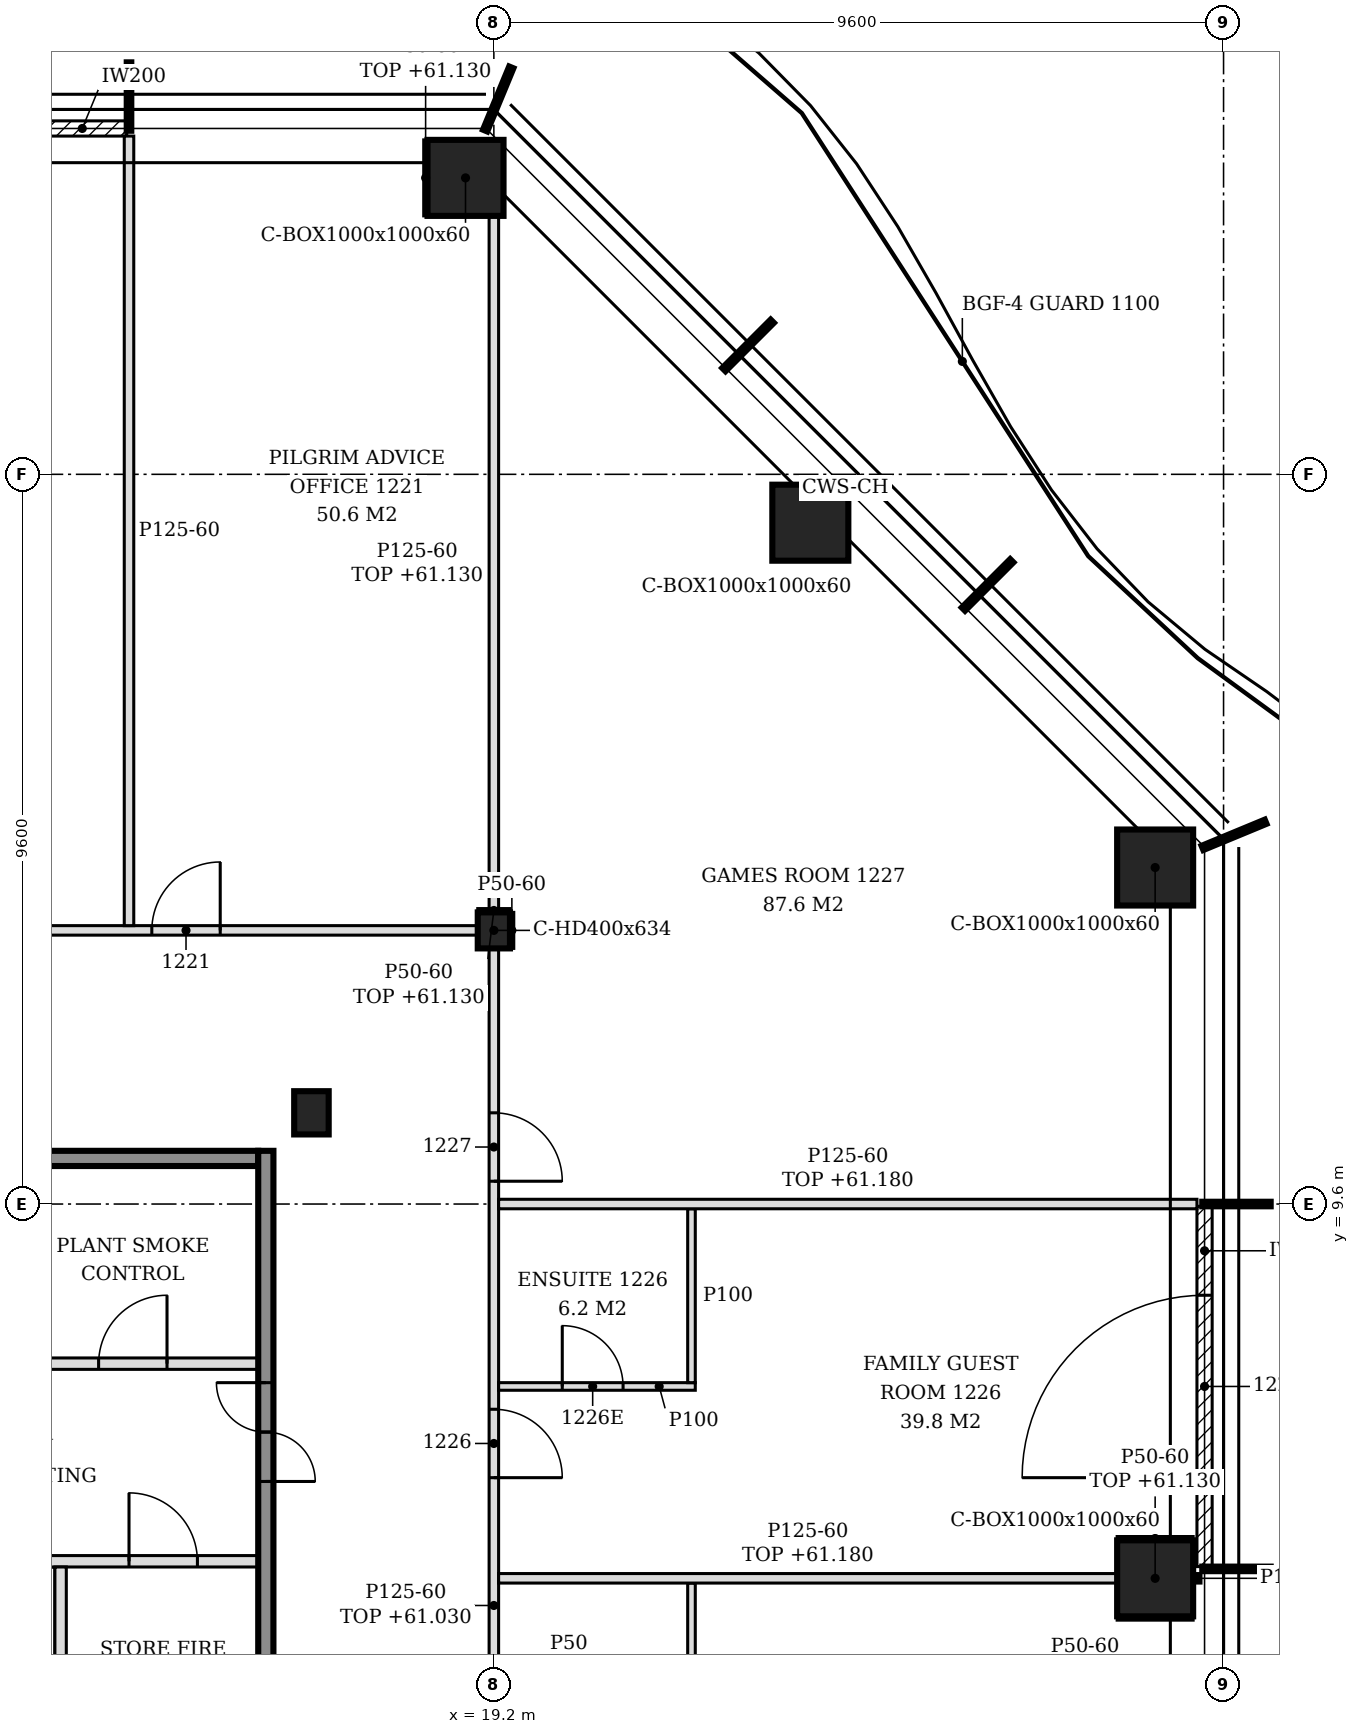
"""IFC4 building model, lengths in metres.
Left out: names, types, materials, properties, quantities, classifications, styles, units other than length and angle.
Written with IfcOpenShell. Run it as: python <this file> out.ifc"""

import sys

from ifc_helpers import new_model, si_unit, direction, frame, frame_2d, origin, origin_2d, place, context, subcontext, project, spatial, polyline, rectangle, hollow_rectangle, i_section, outline, extrude, element, fill, save


model = new_model("IFC4")
c1 = context("Model", 3, precision=1e-05, world=origin(), true_north=direction((0.0, 1.0)))
c2 = subcontext(c1, "Body", "Model", "MODEL_VIEW")
j1 = project(units=[si_unit("LENGTHUNIT", "METRE"), si_unit("PLANEANGLEUNIT", "RADIAN")], contexts=[c1])
p1 = place(None, origin())
s1 = spatial("IfcSite", under=j1, at=p1, CompositionType="ELEMENT")
p2 = place(p1, origin())
s2 = spatial("IfcBuilding", under=s1, at=p2, CompositionType="ELEMENT")
p3 = place(p2, frame((0.0, 0.0, 58.2)))
s3 = spatial("IfcBuildingStorey", under=s2, at=p3, CompositionType="ELEMENT", Elevation=58.2)
for number, where, z_axis, x_axis in (
    (1, (27.9, 4.676, -0.15), (0.0, 0.0, 1.0), (1.0, 0.0, 0.0)),
    (2, (27.9, 14.027, -0.15), (0.0, 0.0, 1.0), (1.0, 0.0, 0.0)),
    (3, (23.364, 18.564, -0.15), (0.0, 0.0, 1.0), (1.0, 0.0, 0.0)),
    (4, (18.827, 23.1, -0.15), (0.0, 0.0, 1.0), (1.0, 0.0, 0.0)),
):
    element("IfcColumn", number, at=place(p3, frame(where, z_axis=z_axis, x_axis=x_axis)), inside=s3, PredefinedType="COLUMN", context=c2, shape_type="SweptSolid", body=[
        extrude(hollow_rectangle(XDim=1.0, YDim=1.0, WallThickness=0.06, at=origin_2d()), origin(), (0.0, 0.0, 1.0), 3.6),
    ])
p4 = place(p3, frame((19.2, 13.2, -0.15), z_axis=(0.0, 0.0, 1.0), x_axis=(1.0, 0.0, 0.0)))
e5 = element("IfcColumn", 5, at=p4, inside=s3, PredefinedType="COLUMN", context=c2, shape_type="SweptSolid", body=[
    extrude(i_section(OverallWidth=0.424, OverallDepth=0.474, WebThickness=0.048, FlangeThickness=0.077, FilletRadius=0.015, at=origin_2d()), origin(), (0.0, 0.0, 1.0), 3.6),
])
p5 = place(p3, frame((16.8, 10.8, -0.15), z_axis=(0.0, 0.0, 1.0), x_axis=(1.0, 0.0, 0.0)))
e6 = element("IfcColumn", 6, at=p5, inside=s3, PredefinedType="COLUMN", context=c2, shape_type="SweptSolid", body=[
    extrude(i_section(OverallWidth=0.454, OverallDepth=0.569, WebThickness=0.078, FlangeThickness=0.125, FilletRadius=0.015, at=origin_2d()), origin(), (0.0, 0.0, 1.0), 3.6),
])
p6 = place(p3, frame((28.55, 4.83, 0.0), z_axis=(0.0, 0.0, 1.0), x_axis=(0.0, 1.0, 0.0)))
e7 = element("IfcWall", 7, at=p6, inside=s3, PredefinedType="NOTDEFINED", context=c2, shape_type="SweptSolid", body=[
    extrude(rectangle(XDim=4.74, YDim=0.2, at=frame_2d((2.37, 0.0))), origin(), (0.0, 0.0, 1.0), 3.45),
])
p7 = place(p6, frame((1.17, 0.0, 0.0)))
e8 = element("IfcOpeningElement", 8, at=p7, cuts=e7, PredefinedType="OPENING", context=c2, shape_type="SweptSolid", body=[
    extrude(rectangle(XDim=2.4, YDim=2.4, at=frame_2d((1.2, 1.2))), frame((0.0, 0.11, 0.0), z_axis=(0.0, -1.0, 0.0), x_axis=(1.0, 0.0, 0.0)), (0.0, 0.0, 1.0), 0.22),
])
p8 = place(p3, frame((14.37, 23.75, 0.0), z_axis=(0.0, 0.0, 1.0), x_axis=(-1.0, 0.0, 0.0)))
e9 = element("IfcWall", 9, at=p8, inside=s3, PredefinedType="NOTDEFINED", context=c2, shape_type="SweptSolid", body=[
    extrude(rectangle(XDim=4.74, YDim=0.2, at=frame_2d((2.37, 0.0))), origin(), (0.0, 0.0, 1.0), 3.45),
])
p9 = place(p8, frame((1.17, 0.0, 0.0)))
e10 = element("IfcOpeningElement", 10, at=p9, cuts=e9, PredefinedType="OPENING", context=c2, shape_type="SweptSolid", body=[
    extrude(rectangle(XDim=2.4, YDim=2.4, at=frame_2d((1.2, 1.2))), frame((0.0, 0.11, 0.0), z_axis=(0.0, -1.0, 0.0), x_axis=(1.0, 0.0, 0.0)), (0.0, 0.0, 1.0), 0.22),
])
p10 = place(p3, frame((9.7, 4.9, 0.0), z_axis=(0.0, 0.0, 1.0), x_axis=(1.0, 0.0, 0.0)))
e11 = element("IfcWall", 11, at=p10, inside=s3, PredefinedType="SOLIDWALL", context=c2, shape_type="SweptSolid", body=[
    extrude(rectangle(XDim=6.4, YDim=0.15, at=frame_2d((3.2, 0.0))), origin(), (0.0, 0.0, 1.0), 3.45),
])
p11 = place(p10, frame((0.45, 0.0, 0.0)))
e12 = element("IfcOpeningElement", 12, at=p11, cuts=e11, PredefinedType="OPENING", context=c2, shape_type="SweptSolid", body=[
    extrude(rectangle(XDim=1.0, YDim=2.1, at=frame_2d((0.5, 1.05))), frame((0.0, 0.085, 0.0), z_axis=(0.0, -1.0, 0.0), x_axis=(1.0, 0.0, 0.0)), (0.0, 0.0, 1.0), 0.17),
])
p12 = place(p10, frame((2.35, 0.0, 0.0)))
e13 = element("IfcOpeningElement", 13, at=p12, cuts=e11, PredefinedType="OPENING", context=c2, shape_type="SweptSolid", body=[
    extrude(rectangle(XDim=1.0, YDim=2.1, at=frame_2d((0.5, 1.05))), frame((0.0, 0.085, 0.0), z_axis=(0.0, -1.0, 0.0), x_axis=(1.0, 0.0, 0.0)), (0.0, 0.0, 1.0), 0.17),
])
p13 = place(p10, frame((4.7, 0.0, 0.0)))
e14 = element("IfcOpeningElement", 14, at=p13, cuts=e11, PredefinedType="OPENING", context=c2, shape_type="SweptSolid", body=[
    extrude(rectangle(XDim=0.9, YDim=2.1, at=frame_2d((0.45, 1.05))), frame((0.0, 0.085, 0.0), z_axis=(0.0, -1.0, 0.0), x_axis=(1.0, 0.0, 0.0)), (0.0, 0.0, 1.0), 0.17),
])
p14 = place(p3, frame((12.7, 7.5, 0.0), z_axis=(0.0, 0.0, 1.0), x_axis=(1.0, 0.0, 0.0)))
e15 = element("IfcWall", 15, at=p14, inside=s3, PredefinedType="SOLIDWALL", context=c2, shape_type="SweptSolid", body=[
    extrude(rectangle(XDim=3.4, YDim=0.15, at=frame_2d((1.7, 0.0))), origin(), (0.0, 0.0, 1.0), 3.45),
])
p15 = place(p14, frame((1.3, 0.0, 0.0)))
e16 = element("IfcOpeningElement", 16, at=p15, cuts=e15, PredefinedType="OPENING", context=c2, shape_type="SweptSolid", body=[
    extrude(rectangle(XDim=0.9, YDim=2.1, at=frame_2d((0.45, 1.05))), frame((0.0, 0.085, 0.0), z_axis=(0.0, -1.0, 0.0), x_axis=(1.0, 0.0, 0.0)), (0.0, 0.0, 1.0), 0.17),
])
p16 = place(p3, frame((12.7, 10.2, 0.0), z_axis=(0.0, 0.0, 1.0), x_axis=(1.0, 0.0, 0.0)))
e17 = element("IfcWall", 17, at=p16, inside=s3, PredefinedType="SOLIDWALL", context=c2, shape_type="SweptSolid", body=[
    extrude(rectangle(XDim=3.4, YDim=0.2, at=frame_2d((1.7, 0.0))), origin(), (0.0, 0.0, 1.0), 3.45),
])
p17 = place(p3, frame((13.5, 2.275, 0.0), z_axis=(0.0, 0.0, 1.0), x_axis=(0.0, 1.0, 0.0)))
e18 = element("IfcWall", 18, at=p17, inside=s3, PredefinedType="SOLIDWALL", context=c2, shape_type="SweptSolid", body=[
    extrude(rectangle(XDim=2.55, YDim=0.15, at=frame_2d((1.275, 0.0))), origin(), (0.0, 0.0, 1.0), 3.45),
])
p18 = place(p3, frame((16.2, -5.5, 0.0), z_axis=(0.0, 0.0, 1.0), x_axis=(0.0, 1.0, 0.0)))
e19 = element("IfcWall", 19, at=p18, inside=s3, PredefinedType="SOLIDWALL", context=c2, shape_type="SweptSolid", body=[
    extrude(rectangle(XDim=15.8, YDim=0.2, at=frame_2d((7.9, 0.0))), origin(), (0.0, 0.0, 1.0), 3.45),
])
p19 = place(p18, frame((3.05, 0.0, 0.0)))
e20 = element("IfcOpeningElement", 20, at=p19, cuts=e19, PredefinedType="OPENING", context=c2, shape_type="SweptSolid", body=[
    extrude(rectangle(XDim=1.3, YDim=2.1, at=frame_2d((0.65, 1.05))), frame((0.0, 0.11, 0.0), z_axis=(0.0, -1.0, 0.0), x_axis=(1.0, 0.0, 0.0)), (0.0, 0.0, 1.0), 0.22),
])
p20 = place(p18, frame((11.45, 0.0, 0.0)))
e21 = element("IfcOpeningElement", 21, at=p20, cuts=e19, PredefinedType="OPENING", context=c2, shape_type="SweptSolid", body=[
    extrude(rectangle(XDim=1.3, YDim=2.1, at=frame_2d((0.65, 1.05))), frame((0.0, 0.11, 0.0), z_axis=(0.0, -1.0, 0.0), x_axis=(1.0, 0.0, 0.0)), (0.0, 0.0, 1.0), 0.22),
])
p21 = place(p3, frame((21.8, 2.326, 0.0), z_axis=(0.0, 0.0, 1.0), x_axis=(0.0, 1.0, 0.0)))
e22 = element("IfcWall", 22, at=p21, inside=s3, PredefinedType="PARTITIONING", context=c2, shape_type="SweptSolid", body=[
    extrude(rectangle(XDim=2.288, YDim=0.1, at=frame_2d((1.144, 0.0))), origin(), (0.0, 0.0, 1.0), 3.45),
])
p22 = place(p3, frame((19.2, 2.637, 0.0), z_axis=(0.0, 0.0, 1.0), x_axis=(0.0, 1.0, 0.0)))
e23 = element("IfcWall", 23, at=p22, inside=s3, PredefinedType="PARTITIONING", context=c2, shape_type="SweptSolid", body=[
    extrude(rectangle(XDim=10.326, YDim=0.125, at=frame_2d((5.163, 0.0))), origin(), (0.0, 0.0, 1.0), 2.83),
])
p23 = place(p22, frame((3.363, 0.0, 0.0)))
e24 = element("IfcOpeningElement", 24, at=p23, cuts=e23, PredefinedType="OPENING", context=c2, shape_type="SweptSolid", body=[
    extrude(rectangle(XDim=0.9, YDim=2.1, at=frame_2d((0.45, 1.05))), frame((0.0, 0.073, 0.0), z_axis=(0.0, -1.0, 0.0), x_axis=(1.0, 0.0, 0.0)), (0.0, 0.0, 1.0), 0.145),
])
p24 = place(p22, frame((7.263, 0.0, 0.0)))
e25 = element("IfcOpeningElement", 25, at=p24, cuts=e23, PredefinedType="OPENING", context=c2, shape_type="SweptSolid", body=[
    extrude(rectangle(XDim=0.9, YDim=2.1, at=frame_2d((0.45, 1.05))), frame((0.0, 0.073, 0.0), z_axis=(0.0, -1.0, 0.0), x_axis=(1.0, 0.0, 0.0)), (0.0, 0.0, 1.0), 0.145),
])
p25 = place(p3, frame((19.262, 4.676, 0.0), z_axis=(0.0, 0.0, 1.0), x_axis=(1.0, 0.0, 0.0)))
e26 = element("IfcWall", 26, at=p25, inside=s3, PredefinedType="PARTITIONING", context=c2, shape_type="SweptSolid", body=[
    extrude(outline(polyline([(0.0, 0.0), (8.137, 0.0), (8.137, 2.98), (0.087, 2.98), (0.085, 2.83), (0.0, 2.83), (0.0, 0.0)])), frame((0.0, 0.062, 0.0), z_axis=(0.0, -1.0, 0.0), x_axis=(1.0, 0.0, 0.0)), (0.0, 0.0, 1.0), 0.125),
])
p26 = place(p3, frame((28.4, 4.676, 0.0), z_axis=(0.0, 0.0, 1.0), x_axis=(1.0, 0.0, 0.0)))
e27 = element("IfcWall", 27, at=p26, inside=s3, PredefinedType="PARTITIONING", context=c2, shape_type="SweptSolid", body=[
    extrude(rectangle(XDim=0.103, YDim=0.125, at=frame_2d((0.052, 0.0))), origin(), (0.0, 0.0, 1.0), 3.45),
])
p27 = place(p3, frame((19.262, 7.2, 0.0), z_axis=(0.0, 0.0, 1.0), x_axis=(1.0, 0.0, 0.0)))
e28 = element("IfcWall", 28, at=p27, inside=s3, PredefinedType="PARTITIONING", context=c2, shape_type="SweptSolid", body=[
    extrude(outline(polyline([(0.0, 0.0), (2.588, 0.0), (2.587, 3.45), (0.087, 3.45), (0.085, 2.83), (0.0, 2.83), (0.0, 0.0)])), frame((0.0, 0.05, 0.0), z_axis=(0.0, -1.0, 0.0), x_axis=(1.0, 0.0, 0.0)), (0.0, 0.0, 1.0), 0.1),
])
p28 = place(p27, frame((0.837, 0.0, 0.0)))
e29 = element("IfcOpeningElement", 29, at=p28, cuts=e28, PredefinedType="OPENING", context=c2, shape_type="SweptSolid", body=[
    extrude(rectangle(XDim=0.8, YDim=2.1, at=frame_2d((0.4, 1.05))), frame((0.0, 0.06, 0.0), z_axis=(0.0, -1.0, 0.0), x_axis=(1.0, 0.0, 0.0)), (0.0, 0.0, 1.0), 0.12),
])
p29 = place(p3, frame((21.8, 7.25, 0.0), z_axis=(0.0, 0.0, 1.0), x_axis=(0.0, 1.0, 0.0)))
e30 = element("IfcWall", 30, at=p29, inside=s3, PredefinedType="PARTITIONING", context=c2, shape_type="SweptSolid", body=[
    extrude(outline(polyline([(0.0, 0.0), (2.288, 0.0), (2.288, 2.98), (2.255, 2.98), (2.253, 3.45), (0.0, 3.45), (0.0, 0.0)])), frame((0.0, 0.05, 0.0), z_axis=(0.0, -1.0, 0.0), x_axis=(1.0, 0.0, 0.0)), (0.0, 0.0, 1.0), 0.1),
])
p30 = place(p3, frame((19.262, 9.6, 0.0), z_axis=(0.0, 0.0, 1.0), x_axis=(1.0, 0.0, 0.0)))
e31 = element("IfcWall", 31, at=p30, inside=s3, PredefinedType="PARTITIONING", context=c2, shape_type="SweptSolid", body=[
    extrude(outline(polyline([(0.0, 0.0), (9.188, 0.0), (9.188, 2.98), (8.788, 2.98), (8.785, 2.93), (8.488, 2.93), (8.486, 2.98), (0.087, 2.98), (0.085, 2.83), (0.0, 2.83), (0.0, 0.0)])), frame((0.0, 0.062, 0.0), z_axis=(0.0, -1.0, 0.0), x_axis=(1.0, 0.0, 0.0)), (0.0, 0.0, 1.0), 0.125),
])
p31 = place(p3, frame((7.412, 13.2, 0.0), z_axis=(0.0, 0.0, 1.0), x_axis=(1.0, 0.0, 0.0)))
e32 = element("IfcWall", 32, at=p31, inside=s3, PredefinedType="PARTITIONING", context=c2, shape_type="SweptSolid", body=[
    extrude(rectangle(XDim=11.576, YDim=0.125, at=frame_2d((5.788, 0.0))), origin(), (0.0, 0.0, 1.0), 2.83),
])
p32 = place(p31, frame((4.602, 0.0, 0.0)))
e33 = element("IfcOpeningElement", 33, at=p32, cuts=e32, PredefinedType="OPENING", context=c2, shape_type="SweptSolid", body=[
    extrude(rectangle(XDim=0.9, YDim=2.1, at=frame_2d((0.45, 1.05))), frame((0.0, 0.073, 0.0), z_axis=(0.0, -1.0, 0.0), x_axis=(1.0, 0.0, 0.0)), (0.0, 0.0, 1.0), 0.145),
])
p33 = place(p31, frame((7.288, 0.0, 0.0)))
e34 = element("IfcOpeningElement", 34, at=p33, cuts=e32, PredefinedType="OPENING", context=c2, shape_type="SweptSolid", body=[
    extrude(rectangle(XDim=0.9, YDim=2.1, at=frame_2d((0.45, 1.05))), frame((0.0, 0.073, 0.0), z_axis=(0.0, -1.0, 0.0), x_axis=(1.0, 0.0, 0.0)), (0.0, 0.0, 1.0), 0.145),
])
p34 = place(p3, frame((14.4, 13.262, 0.0), z_axis=(0.0, 0.0, 1.0), x_axis=(0.0, 1.0, 0.0)))
e35 = element("IfcWall", 35, at=p34, inside=s3, PredefinedType="PARTITIONING", context=c2, shape_type="SweptSolid", body=[
    extrude(outline(polyline([(0.0, 0.0), (10.387, 0.0), (10.387, 3.45), (9.988, 3.45), (9.986, 2.93), (9.688, 2.93), (9.686, 3.45), (6.042, 3.45), (6.041, 2.88), (5.833, 2.88), (5.831, 3.45), (0.087, 3.45), (0.085, 2.83), (0.0, 2.83), (0.0, 0.0)])), frame((0.0, 0.062, 0.0), z_axis=(0.0, -1.0, 0.0), x_axis=(1.0, 0.0, 0.0)), (0.0, 0.0, 1.0), 0.125),
])
p35 = place(p3, frame((19.2, 13.437, 0.0), z_axis=(0.0, 0.0, 1.0), x_axis=(0.0, 1.0, 0.0)))
e36 = element("IfcWall", 36, at=p35, inside=s3, PredefinedType="PARTITIONING", context=c2, shape_type="SweptSolid", body=[
    extrude(outline(polyline([(0.0, 0.0), (9.163, 0.0), (9.163, 2.63), (8.733, 2.63), (8.731, 2.93), (0.0, 2.93), (0.0, 0.0)])), frame((0.0, 0.062, 0.0), z_axis=(0.0, -1.0, 0.0), x_axis=(1.0, 0.0, 0.0)), (0.0, 0.0, 1.0), 0.125),
])
p36 = place(p3, frame((19.437, 12.963, 0.0), z_axis=(0.0, 0.0, 1.0), x_axis=(0.0, 1.0, 0.0)))
e37 = element("IfcWall", 37, at=p36, inside=s3, PredefinedType="PARTITIONING", context=c2, shape_type="SweptSolid", body=[
    extrude(rectangle(XDim=0.474, YDim=0.05, at=frame_2d((0.237, 0.0))), origin(), (0.0, 0.0, 1.0), 3.45),
])
for number, where, z_axis, x_axis in (
    (38, (27.4, 5.201, 0.0), (0.0, 0.0, 1.0), (1.0, 0.0, 0.0)),
    (39, (27.4, 4.151, 0.0), (0.0, 0.0, 1.0), (1.0, 0.0, 0.0)),
):
    element("IfcWall", number, at=place(p3, frame(where, z_axis=z_axis, x_axis=x_axis)), inside=s3, PredefinedType="PARTITIONING", context=c2, shape_type="SweptSolid", body=[
        extrude(rectangle(XDim=1.0, YDim=0.05, at=frame_2d((0.5, 0.0))), origin(), (0.0, 0.0, 1.0), 2.93),
    ])
p37 = place(p3, frame((18.988, 13.462, 0.0), z_axis=(0.0, 0.0, 1.0), x_axis=(1.0, 0.0, 0.0)))
e40 = element("IfcWall", 40, at=p37, inside=s3, PredefinedType="PARTITIONING", context=c2, shape_type="SweptSolid", body=[
    extrude(rectangle(XDim=0.424, YDim=0.05, at=frame_2d((0.212, 0.0))), origin(), (0.0, 0.0, 1.0), 2.93),
])
p38 = place(p3, frame((18.302, 22.6, 0.0), z_axis=(0.0, 0.0, 1.0), x_axis=(0.0, 1.0, 0.0)))
e41 = element("IfcWall", 41, at=p38, inside=s3, PredefinedType="PARTITIONING", context=c2, shape_type="SweptSolid", body=[
    extrude(rectangle(XDim=1.0, YDim=0.05, at=frame_2d((0.5, 0.0))), origin(), (0.0, 0.0, 1.0), 2.93),
])
p39 = place(p7, origin())
e42 = element("IfcDoor", 42, at=p39, inside=s3, OperationType="SINGLE_SWING_LEFT", PredefinedType="DOOR", context=c2, shape_type="SweptSolid", body=[
    extrude(rectangle(XDim=2.4, YDim=2.4, at=frame_2d((1.2, 1.2))), frame((0.0, 0.025, 0.0), z_axis=(0.0, -1.0, 0.0), x_axis=(1.0, 0.0, 0.0)), (0.0, 0.0, 1.0), 0.05),
])
fill(e8, e42)
p40 = place(p20, origin())
e43 = element("IfcDoor", 43, at=p40, inside=s3, OperationType="DOUBLE_DOOR_SINGLE_SWING", PredefinedType="DOOR", context=c2, shape_type="SweptSolid", body=[
    extrude(rectangle(XDim=1.3, YDim=2.1, at=frame_2d((0.65, 1.05))), frame((0.0, 0.025, 0.0), z_axis=(0.0, -1.0, 0.0), x_axis=(1.0, 0.0, 0.0)), (0.0, 0.0, 1.0), 0.05),
])
fill(e21, e43)
p41 = place(p13, origin())
e44 = element("IfcDoor", 44, at=p41, inside=s3, OperationType="SINGLE_SWING_LEFT", PredefinedType="DOOR", context=c2, shape_type="SweptSolid", body=[
    extrude(rectangle(XDim=0.9, YDim=2.1, at=frame_2d((0.45, 1.05))), frame((0.0, 0.025, 0.0), z_axis=(0.0, -1.0, 0.0), x_axis=(1.0, 0.0, 0.0)), (0.0, 0.0, 1.0), 0.05),
])
fill(e14, e44)
p42 = place(p15, origin())
e45 = element("IfcDoor", 45, at=p42, inside=s3, OperationType="SINGLE_SWING_RIGHT", PredefinedType="DOOR", context=c2, shape_type="SweptSolid", body=[
    extrude(rectangle(XDim=0.9, YDim=2.1, at=frame_2d((0.45, 1.05))), frame((0.0, 0.025, 0.0), z_axis=(0.0, -1.0, 0.0), x_axis=(1.0, 0.0, 0.0)), (0.0, 0.0, 1.0), 0.05),
])
fill(e16, e45)
p43 = place(p33, origin())
e46 = element("IfcDoor", 46, at=p43, inside=s3, OperationType="SINGLE_SWING_RIGHT", PredefinedType="DOOR", context=c2, shape_type="SweptSolid", body=[
    extrude(rectangle(XDim=0.9, YDim=2.1, at=frame_2d((0.45, 1.05))), frame((0.0, 0.025, 0.0), z_axis=(0.0, -1.0, 0.0), x_axis=(1.0, 0.0, 0.0)), (0.0, 0.0, 1.0), 0.05),
])
fill(e34, e46)
p44 = place(p23, frame((0.9, 0.0, 0.0), z_axis=(0.0, 0.0, 1.0), x_axis=(-1.0, 0.0, 0.0)))
e47 = element("IfcDoor", 47, at=p44, inside=s3, OperationType="SINGLE_SWING_RIGHT", PredefinedType="DOOR", context=c2, shape_type="SweptSolid", body=[
    extrude(rectangle(XDim=0.9, YDim=2.1, at=frame_2d((0.45, 1.05))), frame((0.0, 0.025, 0.0), z_axis=(0.0, -1.0, 0.0), x_axis=(1.0, 0.0, 0.0)), (0.0, 0.0, 1.0), 0.05),
])
fill(e24, e47)
p45 = place(p28, origin())
e48 = element("IfcDoor", 48, at=p45, inside=s3, OperationType="SINGLE_SWING_LEFT", PredefinedType="DOOR", context=c2, shape_type="SweptSolid", body=[
    extrude(rectangle(XDim=0.8, YDim=2.1, at=frame_2d((0.4, 1.05))), frame((0.0, 0.025, 0.0), z_axis=(0.0, -1.0, 0.0), x_axis=(1.0, 0.0, 0.0)), (0.0, 0.0, 1.0), 0.05),
])
fill(e29, e48)
p46 = place(p24, frame((0.9, 0.0, 0.0), z_axis=(0.0, 0.0, 1.0), x_axis=(-1.0, 0.0, 0.0)))
e49 = element("IfcDoor", 49, at=p46, inside=s3, OperationType="SINGLE_SWING_RIGHT", PredefinedType="DOOR", context=c2, shape_type="SweptSolid", body=[
    extrude(rectangle(XDim=0.9, YDim=2.1, at=frame_2d((0.45, 1.05))), frame((0.0, 0.025, 0.0), z_axis=(0.0, -1.0, 0.0), x_axis=(1.0, 0.0, 0.0)), (0.0, 0.0, 1.0), 0.05),
])
fill(e25, e49)
save(model, sys.argv[1])
